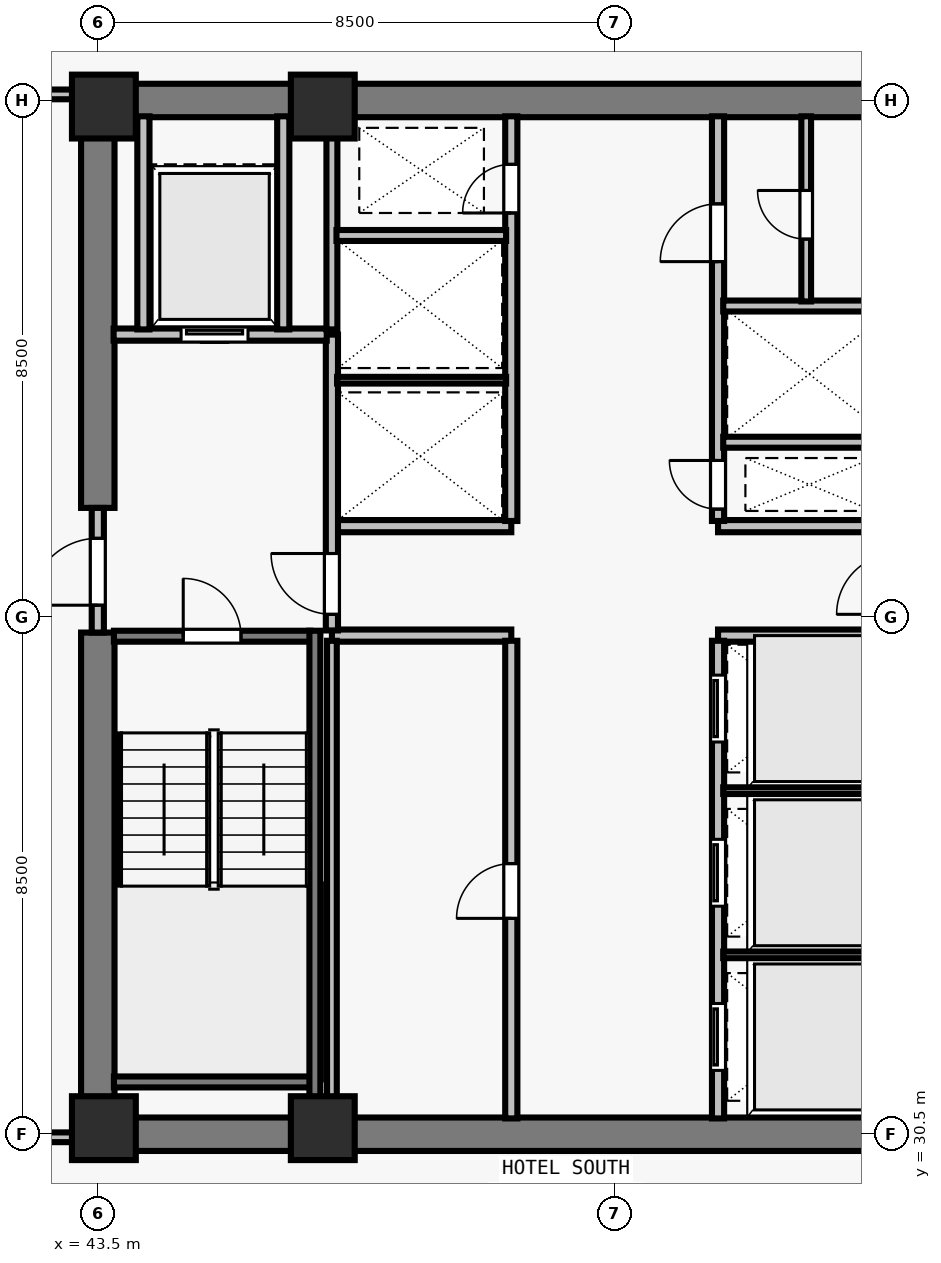
"""IFC4 building model, lengths in metres.
Left out: names, types, materials, properties, quantities, classifications, styles, units other than length and angle.
Written with IfcOpenShell. Run it as: python <this file> out.ifc"""

import sys

from ifc_helpers import new_model, si_unit, direction, frame, frame_2d, origin, origin_2d, place, context, subcontext, project, spatial, rectangle, extrude, element, fill, save


model = new_model("IFC4")
c1 = context("Model", 3, precision=1e-05, world=origin(), true_north=direction((0.0, 1.0)))
c2 = subcontext(c1, "Body", "Model", "MODEL_VIEW")
j1 = project(units=[si_unit("LENGTHUNIT", "METRE"), si_unit("PLANEANGLEUNIT", "RADIAN")], contexts=[c1])
p1 = place(None, origin())
s1 = spatial("IfcSite", under=j1, at=p1, CompositionType="ELEMENT")
p2 = place(p1, origin())
s2 = spatial("IfcBuilding", under=s1, at=p2, CompositionType="ELEMENT")
p3 = place(p2, frame((0.0, 0.0, 116.5)))
s3 = spatial("IfcBuildingStorey", under=s2, at=p3, CompositionType="ELEMENT", Elevation=116.5)
for number, where, z_axis, x_axis in (
    (1, (43.6, 30.6, 0.0), (0.0, 0.0, 1.0), (1.0, 0.0, 0.0)),
    (2, (47.2, 30.6, 0.0), (0.0, 0.0, 1.0), (1.0, 0.0, 0.0)),
    (3, (43.6, 47.4, 0.0), (0.0, 0.0, 1.0), (1.0, 0.0, 0.0)),
    (4, (47.2, 47.4, 0.0), (0.0, 0.0, 1.0), (1.0, 0.0, 0.0)),
):
    element("IfcColumn", number, at=place(p3, frame(where, z_axis=z_axis, x_axis=x_axis)), inside=s3, PredefinedType="COLUMN", context=c2, shape_type="SweptSolid", body=[
        extrude(rectangle(XDim=1.05, YDim=1.05, at=origin_2d()), origin(), (0.0, 0.0, 1.0), 3.5),
    ])
for number, where, z_axis, x_axis in (
    (5, (43.225, 30.5, 0.0), (0.0, 0.0, 1.0), (1.0, 0.0, 0.0)),
    (6, (43.225, 47.5, 0.0), (0.0, 0.0, 1.0), (1.0, 0.0, 0.0)),
):
    element("IfcWall", number, at=place(p3, frame(where, z_axis=z_axis, x_axis=x_axis)), inside=s3, PredefinedType="SHEAR", context=c2, shape_type="SweptSolid", body=[
        extrude(rectangle(XDim=17.55, YDim=0.55, at=frame_2d((8.775, 0.0))), origin(), (0.0, 0.0, 1.0), 3.28),
    ])
p4 = place(p3, frame((43.5, 30.765, 0.0), z_axis=(0.0, 0.0, 1.0), x_axis=(0.0, 1.0, 0.0)))
e7 = element("IfcWall", 7, at=p4, inside=s3, PredefinedType="SHEAR", context=c2, shape_type="SweptSolid", body=[
    extrude(rectangle(XDim=7.985, YDim=0.55, at=frame_2d((3.993, 0.0))), origin(), (0.0, 0.0, 1.0), 3.28),
])
p5 = place(p3, frame((43.5, 40.8, 0.0), z_axis=(0.0, 0.0, 1.0), x_axis=(0.0, 1.0, 0.0)))
e8 = element("IfcWall", 8, at=p5, inside=s3, PredefinedType="SHEAR", context=c2, shape_type="SweptSolid", body=[
    extrude(rectangle(XDim=6.435, YDim=0.55, at=frame_2d((3.218, 0.0))), origin(), (0.0, 0.0, 1.0), 3.28),
])
for number, where, z_axis, x_axis in (
    (9, (47.35, 38.7, 0.0), (0.0, 0.0, 1.0), (1.0, 0.0, 0.0)),
    (10, (47.35, 40.5, 0.0), (0.0, 0.0, 1.0), (1.0, 0.0, 0.0)),
    (11, (53.7, 38.7, 0.0), (0.0, 0.0, 1.0), (1.0, 0.0, 0.0)),
    (12, (53.7, 40.5, 0.0), (0.0, 0.0, 1.0), (1.0, 0.0, 0.0)),
):
    element("IfcWall", number, at=place(p3, frame(where, z_axis=z_axis, x_axis=x_axis)), inside=s3, PredefinedType="SOLIDWALL", context=c2, shape_type="SweptSolid", body=[
        extrude(rectangle(XDim=2.95, YDim=0.2, at=frame_2d((1.475, 0.0))), origin(), (0.0, 0.0, 1.0), 3.28),
    ])
p6 = place(p3, frame((50.3, 30.76, 0.0), z_axis=(0.0, 0.0, 1.0), x_axis=(0.0, 1.0, 0.0)))
e13 = element("IfcWall", 13, at=p6, inside=s3, PredefinedType="SOLIDWALL", context=c2, shape_type="SweptSolid", body=[
    extrude(rectangle(XDim=7.855, YDim=0.2, at=frame_2d((3.927, 0.0))), origin(), (0.0, 0.0, 1.0), 3.28),
])
p7 = place(p6, frame((3.29, 0.0, 0.0)))
e14 = element("IfcOpeningElement", 14, at=p7, cuts=e13, PredefinedType="OPENING", context=c2, shape_type="SweptSolid", body=[
    extrude(rectangle(XDim=0.9, YDim=2.12, at=frame_2d((0.45, 1.06))), frame((0.0, 0.11, 0.0), z_axis=(0.0, -1.0, 0.0), x_axis=(1.0, 0.0, 0.0)), (0.0, 0.0, 1.0), 0.22),
])
p8 = place(p3, frame((53.7, 30.76, 0.0), z_axis=(0.0, 0.0, 1.0), x_axis=(0.0, 1.0, 0.0)))
e15 = element("IfcWall", 15, at=p8, inside=s3, PredefinedType="SOLIDWALL", context=c2, shape_type="SweptSolid", body=[
    extrude(rectangle(XDim=7.855, YDim=0.2, at=frame_2d((3.927, 0.0))), origin(), (0.0, 0.0, 1.0), 3.28),
])
p9 = place(p8, frame((0.79, 0.0, 0.0)))
e16 = element("IfcOpeningElement", 16, at=p9, cuts=e15, PredefinedType="OPENING", context=c2, shape_type="SweptSolid", body=[
    extrude(rectangle(XDim=1.1, YDim=2.2, at=frame_2d((0.55, 1.1))), frame((0.0, 0.11, 0.0), z_axis=(0.0, -1.0, 0.0), x_axis=(1.0, 0.0, 0.0)), (0.0, 0.0, 1.0), 0.22),
])
p10 = place(p8, frame((3.49, 0.0, 0.0)))
e17 = element("IfcOpeningElement", 17, at=p10, cuts=e15, PredefinedType="OPENING", context=c2, shape_type="SweptSolid", body=[
    extrude(rectangle(XDim=1.1, YDim=2.2, at=frame_2d((0.55, 1.1))), frame((0.0, 0.11, 0.0), z_axis=(0.0, -1.0, 0.0), x_axis=(1.0, 0.0, 0.0)), (0.0, 0.0, 1.0), 0.22),
])
p11 = place(p8, frame((6.19, 0.0, 0.0)))
e18 = element("IfcOpeningElement", 18, at=p11, cuts=e15, PredefinedType="OPENING", context=c2, shape_type="SweptSolid", body=[
    extrude(rectangle(XDim=1.1, YDim=2.2, at=frame_2d((0.55, 1.1))), frame((0.0, 0.11, 0.0), z_axis=(0.0, -1.0, 0.0), x_axis=(1.0, 0.0, 0.0)), (0.0, 0.0, 1.0), 0.22),
])
p12 = place(p3, frame((50.3, 40.585, 0.0), z_axis=(0.0, 0.0, 1.0), x_axis=(0.0, 1.0, 0.0)))
e19 = element("IfcWall", 19, at=p12, inside=s3, PredefinedType="SOLIDWALL", context=c2, shape_type="SweptSolid", body=[
    extrude(rectangle(XDim=6.655, YDim=0.2, at=frame_2d((3.328, 0.0))), origin(), (0.0, 0.0, 1.0), 3.28),
])
p13 = place(p12, frame((5.065, 0.0, 0.0)))
e20 = element("IfcOpeningElement", 20, at=p13, cuts=e19, PredefinedType="OPENING", context=c2, shape_type="SweptSolid", body=[
    extrude(rectangle(XDim=0.8, YDim=2.08, at=frame_2d((0.4, 1.04))), frame((0.0, 0.11, 0.0), z_axis=(0.0, -1.0, 0.0), x_axis=(1.0, 0.0, 0.0)), (0.0, 0.0, 1.0), 0.22),
])
p14 = place(p3, frame((53.7, 40.585, 0.0), z_axis=(0.0, 0.0, 1.0), x_axis=(0.0, 1.0, 0.0)))
e21 = element("IfcWall", 21, at=p14, inside=s3, PredefinedType="SOLIDWALL", context=c2, shape_type="SweptSolid", body=[
    extrude(rectangle(XDim=6.655, YDim=0.2, at=frame_2d((3.328, 0.0))), origin(), (0.0, 0.0, 1.0), 3.28),
])
p15 = place(p14, frame((0.195, 0.0, 0.0)))
e22 = element("IfcOpeningElement", 22, at=p15, cuts=e21, PredefinedType="OPENING", context=c2, shape_type="SweptSolid", body=[
    extrude(rectangle(XDim=0.8, YDim=2.08, at=frame_2d((0.4, 1.04))), frame((0.0, 0.11, 0.0), z_axis=(0.0, -1.0, 0.0), x_axis=(1.0, 0.0, 0.0)), (0.0, 0.0, 1.0), 0.22),
])
p16 = place(p14, frame((4.265, 0.0, 0.0)))
e23 = element("IfcOpeningElement", 23, at=p16, cuts=e21, PredefinedType="OPENING", context=c2, shape_type="SweptSolid", body=[
    extrude(rectangle(XDim=0.95, YDim=2.12, at=frame_2d((0.475, 1.06))), frame((0.0, 0.11, 0.0), z_axis=(0.0, -1.0, 0.0), x_axis=(1.0, 0.0, 0.0)), (0.0, 0.0, 1.0), 0.22),
])
p17 = place(p3, frame((43.5, 38.75, 0.0), z_axis=(0.0, 0.0, 1.0), x_axis=(0.0, 1.0, 0.0)))
e24 = element("IfcWall", 24, at=p17, inside=s3, PredefinedType="SOLIDWALL", context=c2, shape_type="SweptSolid", body=[
    extrude(rectangle(XDim=2.05, YDim=0.2, at=frame_2d((1.025, 0.0))), origin(), (0.0, 0.0, 1.0), 3.28),
])
p18 = place(p17, frame((0.45, 0.0, 0.0)))
e25 = element("IfcOpeningElement", 25, at=p18, cuts=e24, PredefinedType="OPENING", context=c2, shape_type="SweptSolid", body=[
    extrude(rectangle(XDim=1.1, YDim=2.15, at=frame_2d((0.55, 1.075))), frame((0.0, 0.11, 0.0), z_axis=(0.0, -1.0, 0.0), x_axis=(1.0, 0.0, 0.0)), (0.0, 0.0, 1.0), 0.22),
])
p19 = place(p3, frame((47.35, 38.785, 0.0), z_axis=(0.0, 0.0, 1.0), x_axis=(0.0, 1.0, 0.0)))
e26 = element("IfcWall", 26, at=p19, inside=s3, PredefinedType="SOLIDWALL", context=c2, shape_type="SweptSolid", body=[
    extrude(rectangle(XDim=4.865, YDim=0.2, at=frame_2d((2.433, 0.0))), origin(), (0.0, 0.0, 1.0), 3.28),
])
p20 = place(p19, frame((0.265, 0.0, 0.0)))
e27 = element("IfcOpeningElement", 27, at=p20, cuts=e26, PredefinedType="OPENING", context=c2, shape_type="SweptSolid", body=[
    extrude(rectangle(XDim=1.0, YDim=2.15, at=frame_2d((0.5, 1.075))), frame((0.0, 0.11, 0.0), z_axis=(0.0, -1.0, 0.0), x_axis=(1.0, 0.0, 0.0)), (0.0, 0.0, 1.0), 0.22),
])
p21 = place(p3, frame((43.76, 43.65, 0.0), z_axis=(0.0, 0.0, 1.0), x_axis=(1.0, 0.0, 0.0)))
e28 = element("IfcWall", 28, at=p21, inside=s3, PredefinedType="SOLIDWALL", context=c2, shape_type="SweptSolid", body=[
    extrude(rectangle(XDim=3.505, YDim=0.2, at=frame_2d((1.752, 0.0))), origin(), (0.0, 0.0, 1.0), 3.28),
])
p22 = place(p21, frame((1.11, 0.0, 0.0)))
e29 = element("IfcOpeningElement", 29, at=p22, cuts=e28, PredefinedType="OPENING", context=c2, shape_type="SweptSolid", body=[
    extrude(rectangle(XDim=1.1, YDim=2.2, at=frame_2d((0.55, 1.1))), frame((0.0, 0.11, 0.0), z_axis=(0.0, -1.0, 0.0), x_axis=(1.0, 0.0, 0.0)), (0.0, 0.0, 1.0), 0.22),
])
for number, where, z_axis, x_axis in (
    (30, (46.55, 43.735, 0.0), (0.0, 0.0, 1.0), (0.0, 1.0, 0.0)),
    (31, (44.25, 43.735, 0.0), (0.0, 0.0, 1.0), (0.0, 1.0, 0.0)),
):
    element("IfcWall", number, at=place(p3, frame(where, z_axis=z_axis, x_axis=x_axis)), inside=s3, PredefinedType="SOLIDWALL", context=c2, shape_type="SweptSolid", body=[
        extrude(rectangle(XDim=3.505, YDim=0.2, at=frame_2d((1.752, 0.0))), origin(), (0.0, 0.0, 1.0), 3.28),
    ])
p23 = place(p3, frame((47.35, 30.76, 0.0), z_axis=(0.0, 0.0, 1.0), x_axis=(0.0, 1.0, 0.0)))
e32 = element("IfcWall", 32, at=p23, inside=s3, PredefinedType="PARTITIONING", context=c2, shape_type="SweptSolid", body=[
    extrude(rectangle(XDim=7.855, YDim=0.16, at=frame_2d((3.927, 0.0))), origin(), (0.0, 0.0, 1.0), 3.28),
])
for number, where, z_axis, x_axis in (
    (33, (53.785, 33.45, 0.0), (0.0, 0.0, 1.0), (1.0, 0.0, 0.0)),
    (34, (53.785, 36.15, 0.0), (0.0, 0.0, 1.0), (1.0, 0.0, 0.0)),
):
    element("IfcWall", number, at=place(p3, frame(where, z_axis=z_axis, x_axis=x_axis)), inside=s3, PredefinedType="PARTITIONING", context=c2, shape_type="SweptSolid", body=[
        extrude(rectangle(XDim=2.79, YDim=0.11, at=frame_2d((1.395, 0.0))), origin(), (0.0, 0.0, 1.0), 3.28),
    ])
p24 = place(p3, frame((47.35, 43.735, 0.0), z_axis=(0.0, 0.0, 1.0), x_axis=(0.0, 1.0, 0.0)))
e35 = element("IfcWall", 35, at=p24, inside=s3, PredefinedType="SOLIDWALL", context=c2, shape_type="SweptSolid", body=[
    extrude(rectangle(XDim=3.505, YDim=0.18, at=frame_2d((1.752, 0.0))), origin(), (0.0, 0.0, 1.0), 3.28),
])
p25 = place(p3, frame((47.435, 42.9, 0.0), z_axis=(0.0, 0.0, 1.0), x_axis=(1.0, 0.0, 0.0)))
e36 = element("IfcWall", 36, at=p25, inside=s3, PredefinedType="PARTITIONING", context=c2, shape_type="SweptSolid", body=[
    extrude(rectangle(XDim=2.78, YDim=0.11, at=frame_2d((1.39, 0.0))), origin(), (0.0, 0.0, 1.0), 3.28),
])
p26 = place(p3, frame((47.425, 45.28, 0.0), z_axis=(0.0, 0.0, 1.0), x_axis=(1.0, 0.0, 0.0)))
e37 = element("IfcWall", 37, at=p26, inside=s3, PredefinedType="SOLIDWALL", context=c2, shape_type="SweptSolid", body=[
    extrude(rectangle(XDim=2.79, YDim=0.18, at=frame_2d((1.395, 0.0))), origin(), (0.0, 0.0, 1.0), 3.28),
])
p27 = place(p3, frame((53.785, 41.88, 0.0), z_axis=(0.0, 0.0, 1.0), x_axis=(1.0, 0.0, 0.0)))
e38 = element("IfcWall", 38, at=p27, inside=s3, PredefinedType="SOLIDWALL", context=c2, shape_type="SweptSolid", body=[
    extrude(rectangle(XDim=2.78, YDim=0.18, at=frame_2d((1.39, 0.0))), origin(), (0.0, 0.0, 1.0), 3.28),
])
p28 = place(p3, frame((53.785, 44.12, 0.0), z_axis=(0.0, 0.0, 1.0), x_axis=(1.0, 0.0, 0.0)))
e39 = element("IfcWall", 39, at=p28, inside=s3, PredefinedType="SOLIDWALL", context=c2, shape_type="SweptSolid", body=[
    extrude(rectangle(XDim=2.79, YDim=0.18, at=frame_2d((1.395, 0.0))), origin(), (0.0, 0.0, 1.0), 3.28),
])
p29 = place(p3, frame((55.15, 44.195, 0.0), z_axis=(0.0, 0.0, 1.0), x_axis=(0.0, 1.0, 0.0)))
e40 = element("IfcWall", 40, at=p29, inside=s3, PredefinedType="PARTITIONING", context=c2, shape_type="SweptSolid", body=[
    extrude(rectangle(XDim=3.045, YDim=0.16, at=frame_2d((1.522, 0.0))), origin(), (0.0, 0.0, 1.0), 3.28),
])
p30 = place(p29, frame((1.025, 0.0, 0.0)))
e41 = element("IfcOpeningElement", 41, at=p30, cuts=e40, PredefinedType="OPENING", context=c2, shape_type="SweptSolid", body=[
    extrude(rectangle(XDim=0.8, YDim=2.1, at=frame_2d((0.4, 1.05))), frame((0.0, 0.09, 0.0), z_axis=(0.0, -1.0, 0.0), x_axis=(1.0, 0.0, 0.0)), (0.0, 0.0, 1.0), 0.18),
])
p31 = place(p3, frame((40.1, 30.45, 0.0), z_axis=(0.0, 0.0, 1.0), x_axis=(1.0, 0.0, 0.0)))
e42 = element("IfcWall", 42, at=p31, inside=s3, PredefinedType="PARTITIONING", context=c2, shape_type="SweptSolid", body=[
    extrude(rectangle(XDim=3.135, YDim=0.16, at=frame_2d((1.567, 0.0))), origin(), (0.0, 0.0, 1.0), 3.28),
])
p32 = place(p3, frame((40.165, 47.6, 0.0), z_axis=(0.0, 0.0, 1.0), x_axis=(1.0, 0.0, 0.0)))
e43 = element("IfcWall", 43, at=p32, inside=s3, PredefinedType="PARTITIONING", context=c2, shape_type="SweptSolid", body=[
    extrude(rectangle(XDim=3.07, YDim=0.16, at=frame_2d((1.535, 0.0))), origin(), (0.0, 0.0, 1.0), 3.28),
])
p33 = place(p3, frame((43.765, 38.69, 0.0), z_axis=(0.0, 0.0, 1.0), x_axis=(1.0, 0.0, 0.0)))
e44 = element("IfcWall", 44, at=p33, inside=s3, PredefinedType="SOLIDWALL", context=c2, shape_type="SweptSolid", body=[
    extrude(rectangle(XDim=3.23, YDim=0.18, at=frame_2d((1.615, 0.0))), origin(), (0.0, 0.0, 1.0), 3.28),
])
p34 = place(p33, frame((1.14, 0.0, 0.0)))
e45 = element("IfcOpeningElement", 45, at=p34, cuts=e44, PredefinedType="OPENING", context=c2, shape_type="SweptSolid", body=[
    extrude(rectangle(XDim=0.95, YDim=2.15, at=frame_2d((0.475, 1.075))), frame((0.0, 0.1, 0.0), z_axis=(0.0, -1.0, 0.0), x_axis=(1.0, 0.0, 0.0)), (0.0, 0.0, 1.0), 0.2),
])
p35 = place(p3, frame((43.765, 31.36, 0.0), z_axis=(0.0, 0.0, 1.0), x_axis=(1.0, 0.0, 0.0)))
e46 = element("IfcWall", 46, at=p35, inside=s3, PredefinedType="SOLIDWALL", context=c2, shape_type="SweptSolid", body=[
    extrude(rectangle(XDim=3.23, YDim=0.18, at=frame_2d((1.615, 0.0))), origin(), (0.0, 0.0, 1.0), 3.28),
])
p36 = place(p3, frame((47.07, 38.78, 0.0), z_axis=(0.0, 0.0, 1.0), x_axis=(0.0, -1.0, 0.0)))
e47 = element("IfcWall", 47, at=p36, inside=s3, PredefinedType="SOLIDWALL", context=c2, shape_type="SweptSolid", body=[
    extrude(rectangle(XDim=8.017, YDim=0.18, at=frame_2d((4.009, 0.0))), origin(), (0.0, 0.0, 1.0), 3.28),
])
p37 = place(p18, origin())
e48 = element("IfcDoor", 48, at=p37, inside=s3, OperationType="SINGLE_SWING_LEFT", PredefinedType="DOOR", context=c2, shape_type="SweptSolid", body=[
    extrude(rectangle(XDim=1.1, YDim=2.15, at=frame_2d((0.55, 1.075))), frame((0.0, 0.025, 0.0), z_axis=(0.0, -1.0, 0.0), x_axis=(1.0, 0.0, 0.0)), (0.0, 0.0, 1.0), 0.05),
])
fill(e25, e48)
p38 = place(p20, origin())
e49 = element("IfcDoor", 49, at=p38, inside=s3, OperationType="SINGLE_SWING_RIGHT", PredefinedType="DOOR", context=c2, shape_type="SweptSolid", body=[
    extrude(rectangle(XDim=1.0, YDim=2.15, at=frame_2d((0.5, 1.075))), frame((0.0, 0.025, 0.0), z_axis=(0.0, -1.0, 0.0), x_axis=(1.0, 0.0, 0.0)), (0.0, 0.0, 1.0), 0.05),
])
fill(e27, e49)
p39 = place(p22, origin())
e50 = element("IfcDoor", 50, at=p39, inside=s3, OperationType="SLIDING_TO_LEFT", PredefinedType="DOOR", context=c2, shape_type="SweptSolid", body=[
    extrude(rectangle(XDim=1.1, YDim=2.2, at=frame_2d((0.55, 1.1))), frame((0.0, 0.025, 0.0), z_axis=(0.0, -1.0, 0.0), x_axis=(1.0, 0.0, 0.0)), (0.0, 0.0, 1.0), 0.05),
])
fill(e29, e50)
p40 = place(p7, origin())
e51 = element("IfcDoor", 51, at=p40, inside=s3, OperationType="SINGLE_SWING_LEFT", PredefinedType="DOOR", context=c2, shape_type="SweptSolid", body=[
    extrude(rectangle(XDim=0.9, YDim=2.12, at=frame_2d((0.45, 1.06))), frame((0.0, 0.025, 0.0), z_axis=(0.0, -1.0, 0.0), x_axis=(1.0, 0.0, 0.0)), (0.0, 0.0, 1.0), 0.05),
])
fill(e14, e51)
p41 = place(p9, origin())
e52 = element("IfcDoor", 52, at=p41, inside=s3, OperationType="SLIDING_TO_LEFT", PredefinedType="DOOR", context=c2, shape_type="SweptSolid", body=[
    extrude(rectangle(XDim=1.1, YDim=2.2, at=frame_2d((0.55, 1.1))), frame((0.0, 0.025, 0.0), z_axis=(0.0, -1.0, 0.0), x_axis=(1.0, 0.0, 0.0)), (0.0, 0.0, 1.0), 0.05),
])
fill(e16, e52)
p42 = place(p10, origin())
e53 = element("IfcDoor", 53, at=p42, inside=s3, OperationType="SLIDING_TO_LEFT", PredefinedType="DOOR", context=c2, shape_type="SweptSolid", body=[
    extrude(rectangle(XDim=1.1, YDim=2.2, at=frame_2d((0.55, 1.1))), frame((0.0, 0.025, 0.0), z_axis=(0.0, -1.0, 0.0), x_axis=(1.0, 0.0, 0.0)), (0.0, 0.0, 1.0), 0.05),
])
fill(e17, e53)
p43 = place(p11, origin())
e54 = element("IfcDoor", 54, at=p43, inside=s3, OperationType="SLIDING_TO_LEFT", PredefinedType="DOOR", context=c2, shape_type="SweptSolid", body=[
    extrude(rectangle(XDim=1.1, YDim=2.2, at=frame_2d((0.55, 1.1))), frame((0.0, 0.025, 0.0), z_axis=(0.0, -1.0, 0.0), x_axis=(1.0, 0.0, 0.0)), (0.0, 0.0, 1.0), 0.05),
])
fill(e18, e54)
p44 = place(p13, origin())
e55 = element("IfcDoor", 55, at=p44, inside=s3, OperationType="SINGLE_SWING_LEFT", PredefinedType="DOOR", context=c2, shape_type="SweptSolid", body=[
    extrude(rectangle(XDim=0.8, YDim=2.08, at=frame_2d((0.4, 1.04))), frame((0.0, 0.025, 0.0), z_axis=(0.0, -1.0, 0.0), x_axis=(1.0, 0.0, 0.0)), (0.0, 0.0, 1.0), 0.05),
])
fill(e20, e55)
p45 = place(p15, origin())
e56 = element("IfcDoor", 56, at=p45, inside=s3, OperationType="SINGLE_SWING_RIGHT", PredefinedType="DOOR", context=c2, shape_type="SweptSolid", body=[
    extrude(rectangle(XDim=0.8, YDim=2.08, at=frame_2d((0.4, 1.04))), frame((0.0, 0.025, 0.0), z_axis=(0.0, -1.0, 0.0), x_axis=(1.0, 0.0, 0.0)), (0.0, 0.0, 1.0), 0.05),
])
fill(e22, e56)
p46 = place(p16, origin())
e57 = element("IfcDoor", 57, at=p46, inside=s3, OperationType="SINGLE_SWING_LEFT", PredefinedType="DOOR", context=c2, shape_type="SweptSolid", body=[
    extrude(rectangle(XDim=0.95, YDim=2.12, at=frame_2d((0.475, 1.06))), frame((0.0, 0.025, 0.0), z_axis=(0.0, -1.0, 0.0), x_axis=(1.0, 0.0, 0.0)), (0.0, 0.0, 1.0), 0.05),
])
fill(e23, e57)
p47 = place(p30, origin())
e58 = element("IfcDoor", 58, at=p47, inside=s3, OperationType="SINGLE_SWING_RIGHT", PredefinedType="DOOR", context=c2, shape_type="SweptSolid", body=[
    extrude(rectangle(XDim=0.8, YDim=2.1, at=frame_2d((0.4, 1.05))), frame((0.0, 0.025, 0.0), z_axis=(0.0, -1.0, 0.0), x_axis=(1.0, 0.0, 0.0)), (0.0, 0.0, 1.0), 0.05),
])
fill(e41, e58)
p48 = place(p34, origin())
e59 = element("IfcDoor", 59, at=p48, inside=s3, OperationType="SINGLE_SWING_LEFT", PredefinedType="DOOR", context=c2, shape_type="SweptSolid", body=[
    extrude(rectangle(XDim=0.95, YDim=2.15, at=frame_2d((0.475, 1.075))), frame((0.0, 0.025, 0.0), z_axis=(0.0, -1.0, 0.0), x_axis=(1.0, 0.0, 0.0)), (0.0, 0.0, 1.0), 0.05),
])
fill(e45, e59)
save(model, sys.argv[1])
